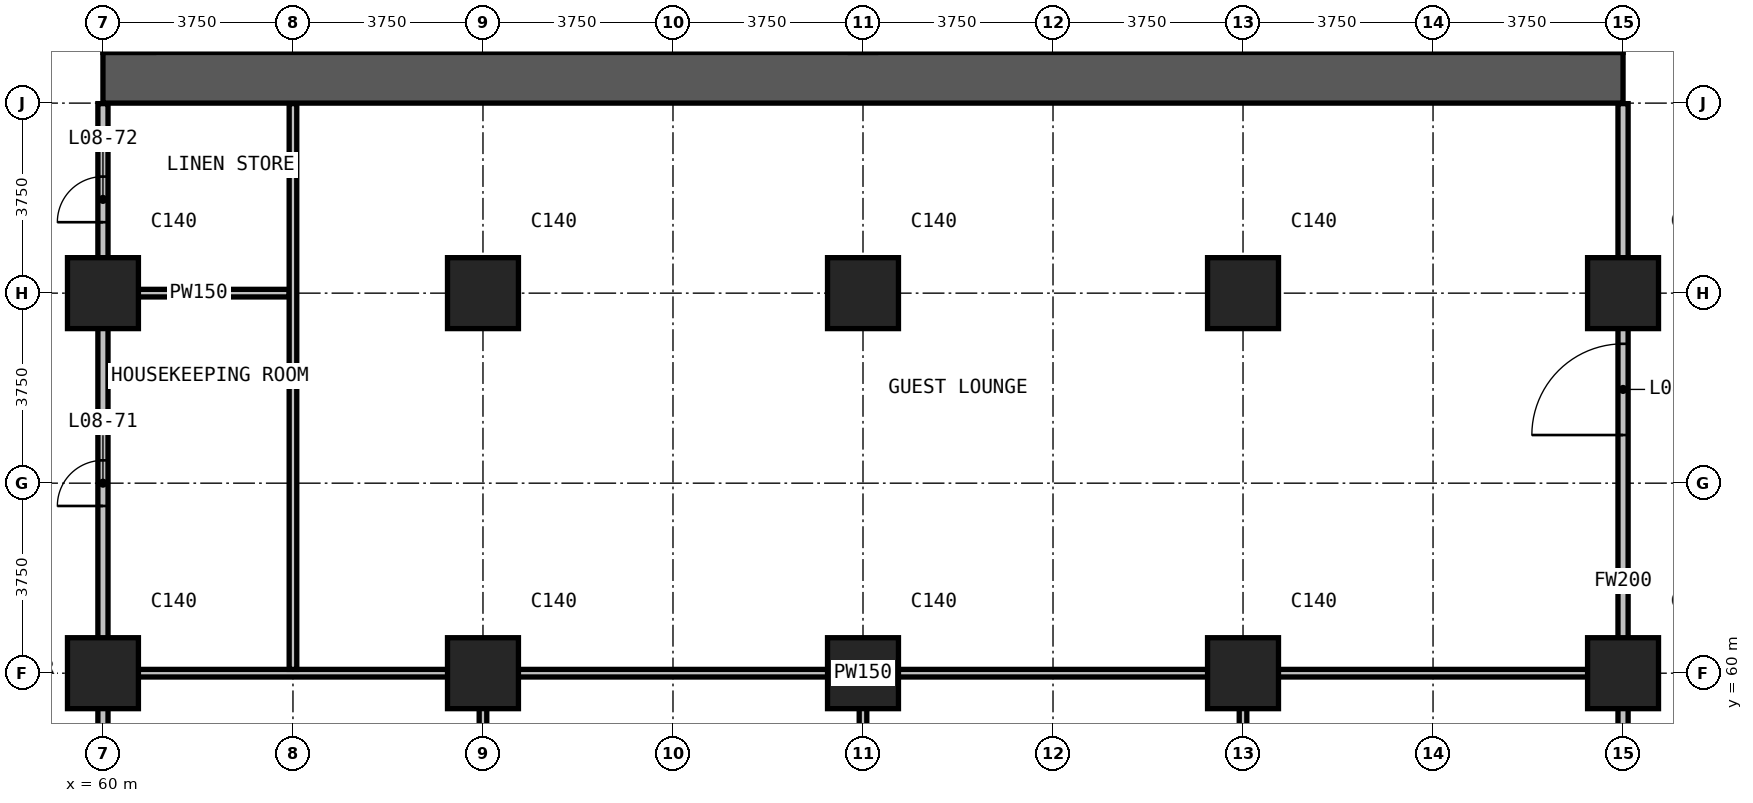
"""IFC4 building model, lengths in metres.
Left out: names, types, materials, properties, quantities, classifications, styles, units other than length and angle.
Written with IfcOpenShell. Run it as: python <this file> out.ifc"""

import sys

from ifc_helpers import new_model, si_unit, direction, frame, frame_2d, origin, origin_2d, place, context, subcontext, project, spatial, rectangle, extrude, element, fill, save


model = new_model("IFC4")
c1 = context("Model", 3, precision=1e-05, world=origin(), true_north=direction((0.0, 1.0)))
c2 = subcontext(c1, "Body", "Model", "MODEL_VIEW")
j1 = project(units=[si_unit("LENGTHUNIT", "METRE"), si_unit("PLANEANGLEUNIT", "RADIAN")], contexts=[c1])
p1 = place(None, origin())
s1 = spatial("IfcSite", under=j1, at=p1, CompositionType="ELEMENT")
p2 = place(p1, origin())
s2 = spatial("IfcBuilding", under=s1, at=p2, CompositionType="ELEMENT")
p3 = place(p2, frame((0.0, 0.0, 46.1)))
s3 = spatial("IfcBuildingStorey", under=s2, at=p3, CompositionType="ELEMENT", Elevation=46.1)
for number, where, z_axis, x_axis in (
    (1, (60.0, 60.0, 0.0), (0.0, 0.0, 1.0), (1.0, 0.0, 0.0)),
    (2, (60.0, 67.5, 0.0), (0.0, 0.0, 1.0), (1.0, 0.0, 0.0)),
    (3, (67.5, 60.0, 0.0), (0.0, 0.0, 1.0), (1.0, 0.0, 0.0)),
    (4, (67.5, 67.5, 0.0), (0.0, 0.0, 1.0), (1.0, 0.0, 0.0)),
    (5, (75.0, 60.0, 0.0), (0.0, 0.0, 1.0), (1.0, 0.0, 0.0)),
    (6, (75.0, 67.5, 0.0), (0.0, 0.0, 1.0), (1.0, 0.0, 0.0)),
    (7, (82.5, 60.0, 0.0), (0.0, 0.0, 1.0), (1.0, 0.0, 0.0)),
    (8, (82.5, 67.5, 0.0), (0.0, 0.0, 1.0), (1.0, 0.0, 0.0)),
    (9, (90.0, 60.0, 0.0), (0.0, 0.0, 1.0), (1.0, 0.0, 0.0)),
    (10, (90.0, 67.5, 0.0), (0.0, 0.0, 1.0), (1.0, 0.0, 0.0)),
):
    element("IfcColumn", number, at=place(p3, frame(where, z_axis=z_axis, x_axis=x_axis)), inside=s3, PredefinedType="COLUMN", context=c2, shape_type="SweptSolid", body=[
        extrude(rectangle(XDim=1.4, YDim=1.4, at=origin_2d()), origin(), (0.0, 0.0, 1.0), 3.3),
    ])
p4 = place(p3, frame((60.0, 71.75, 0.0), z_axis=(0.0, 0.0, 1.0), x_axis=(1.0, 0.0, 0.0)))
e11 = element("IfcWall", 11, at=p4, inside=s3, PredefinedType="SHEAR", context=c2, shape_type="SweptSolid", body=[
    extrude(rectangle(XDim=30.0, YDim=1.0, at=frame_2d((15.0, 0.0))), origin(), (0.0, 0.0, 1.0), 3.3),
])
p5 = place(p3, frame((60.0, 52.4, 0.0), z_axis=(0.0, 0.0, 1.0), x_axis=(0.0, 1.0, 0.0)))
e12 = element("IfcWall", 12, at=p5, inside=s3, PredefinedType="PARTITIONING", context=c2, shape_type="SweptSolid", body=[
    extrude(rectangle(XDim=18.84, YDim=0.2, at=frame_2d((9.42, 0.0))), origin(), (0.0, 0.0, 1.0), 3.0),
])
p6 = place(p5, frame((3.35, 0.0, 0.0)))
e13 = element("IfcOpeningElement", 13, at=p6, cuts=e12, PredefinedType="OPENING", context=c2, shape_type="SweptSolid", body=[
    extrude(rectangle(XDim=1.0, YDim=2.2, at=frame_2d((0.5, 1.1))), frame((0.0, 0.11, 0.0), z_axis=(0.0, -1.0, 0.0), x_axis=(1.0, 0.0, 0.0)), (0.0, 0.0, 1.0), 0.22),
])
p7 = place(p5, frame((10.9, 0.0, 0.0)))
e14 = element("IfcOpeningElement", 14, at=p7, cuts=e12, PredefinedType="OPENING", context=c2, shape_type="SweptSolid", body=[
    extrude(rectangle(XDim=0.9, YDim=2.2, at=frame_2d((0.45, 1.1))), frame((0.0, 0.11, 0.0), z_axis=(0.0, -1.0, 0.0), x_axis=(1.0, 0.0, 0.0)), (0.0, 0.0, 1.0), 0.22),
])
p8 = place(p5, frame((16.5, 0.0, 0.0)))
e15 = element("IfcOpeningElement", 15, at=p8, cuts=e12, PredefinedType="OPENING", context=c2, shape_type="SweptSolid", body=[
    extrude(rectangle(XDim=0.9, YDim=2.2, at=frame_2d((0.45, 1.1))), frame((0.0, 0.11, 0.0), z_axis=(0.0, -1.0, 0.0), x_axis=(1.0, 0.0, 0.0)), (0.0, 0.0, 1.0), 0.22),
])
p9 = place(p3, frame((90.0, 52.4, 0.0), z_axis=(0.0, 0.0, 1.0), x_axis=(0.0, 1.0, 0.0)))
e16 = element("IfcWall", 16, at=p9, inside=s3, PredefinedType="PARTITIONING", context=c2, shape_type="SweptSolid", body=[
    extrude(rectangle(XDim=18.84, YDim=0.2, at=frame_2d((9.42, 0.0))), origin(), (0.0, 0.0, 1.0), 3.0),
])
p10 = place(p9, frame((3.35, 0.0, 0.0)))
e17 = element("IfcOpeningElement", 17, at=p10, cuts=e16, PredefinedType="OPENING", context=c2, shape_type="SweptSolid", body=[
    extrude(rectangle(XDim=1.0, YDim=2.2, at=frame_2d((0.5, 1.1))), frame((0.0, 0.11, 0.0), z_axis=(0.0, -1.0, 0.0), x_axis=(1.0, 0.0, 0.0)), (0.0, 0.0, 1.0), 0.22),
])
p11 = place(p9, frame((12.3, 0.0, 0.0)))
e18 = element("IfcOpeningElement", 18, at=p11, cuts=e16, PredefinedType="OPENING", context=c2, shape_type="SweptSolid", body=[
    extrude(rectangle(XDim=1.8, YDim=2.2, at=frame_2d((0.9, 1.1))), frame((0.0, 0.11, 0.0), z_axis=(0.0, -1.0, 0.0), x_axis=(1.0, 0.0, 0.0)), (0.0, 0.0, 1.0), 0.22),
])
p12 = place(p3, frame((60.1, 60.0, 0.0), z_axis=(0.0, 0.0, 1.0), x_axis=(1.0, 0.0, 0.0)))
e19 = element("IfcWall", 19, at=p12, inside=s3, PredefinedType="PARTITIONING", context=c2, shape_type="SweptSolid", body=[
    extrude(rectangle(XDim=29.8, YDim=0.15, at=frame_2d((14.9, 0.0))), origin(), (0.0, 0.0, 1.0), 3.0),
])
p13 = place(p3, frame((60.1, 67.5, 0.0), z_axis=(0.0, 0.0, 1.0), x_axis=(1.0, 0.0, 0.0)))
e20 = element("IfcWall", 20, at=p13, inside=s3, PredefinedType="PARTITIONING", context=c2, shape_type="SweptSolid", body=[
    extrude(rectangle(XDim=3.575, YDim=0.15, at=frame_2d((1.788, 0.0))), origin(), (0.0, 0.0, 1.0), 3.0),
])
p14 = place(p3, frame((63.75, 60.075, 0.0), z_axis=(0.0, 0.0, 1.0), x_axis=(0.0, 1.0, 0.0)))
e21 = element("IfcWall", 21, at=p14, inside=s3, PredefinedType="PARTITIONING", context=c2, shape_type="SweptSolid", body=[
    extrude(rectangle(XDim=11.165, YDim=0.15, at=frame_2d((5.583, 0.0))), origin(), (0.0, 0.0, 1.0), 3.0),
])
for number, where, z_axis, x_axis in (
    (22, (67.5, 52.6, 0.0), (0.0, 0.0, 1.0), (0.0, 1.0, 0.0)),
    (23, (75.0, 52.6, 0.0), (0.0, 0.0, 1.0), (0.0, 1.0, 0.0)),
    (24, (82.5, 52.6, 0.0), (0.0, 0.0, 1.0), (0.0, 1.0, 0.0)),
):
    element("IfcWall", number, at=place(p3, frame(where, z_axis=z_axis, x_axis=x_axis)), inside=s3, PredefinedType="PARTITIONING", context=c2, shape_type="SweptSolid", body=[
        extrude(rectangle(XDim=7.325, YDim=0.15, at=frame_2d((3.663, 0.0))), origin(), (0.0, 0.0, 1.0), 3.0),
    ])
p15 = place(p7, origin())
e25 = element("IfcDoor", 25, at=p15, inside=s3, OperationType="SINGLE_SWING_RIGHT", PredefinedType="DOOR", context=c2, shape_type="SweptSolid", body=[
    extrude(rectangle(XDim=0.9, YDim=2.2, at=frame_2d((0.45, 1.1))), frame((0.0, 0.025, 0.0), z_axis=(0.0, -1.0, 0.0), x_axis=(1.0, 0.0, 0.0)), (0.0, 0.0, 1.0), 0.05),
])
fill(e14, e25)
p16 = place(p8, origin())
e26 = element("IfcDoor", 26, at=p16, inside=s3, OperationType="SINGLE_SWING_LEFT", PredefinedType="DOOR", context=c2, shape_type="SweptSolid", body=[
    extrude(rectangle(XDim=0.9, YDim=2.2, at=frame_2d((0.45, 1.1))), frame((0.0, 0.025, 0.0), z_axis=(0.0, -1.0, 0.0), x_axis=(1.0, 0.0, 0.0)), (0.0, 0.0, 1.0), 0.05),
])
fill(e15, e26)
p17 = place(p11, origin())
e27 = element("IfcDoor", 27, at=p17, inside=s3, OperationType="DOUBLE_DOOR_SINGLE_SWING", PredefinedType="DOOR", context=c2, shape_type="SweptSolid", body=[
    extrude(rectangle(XDim=1.8, YDim=2.2, at=frame_2d((0.9, 1.1))), frame((0.0, 0.025, 0.0), z_axis=(0.0, -1.0, 0.0), x_axis=(1.0, 0.0, 0.0)), (0.0, 0.0, 1.0), 0.05),
])
fill(e18, e27)
save(model, sys.argv[1])
